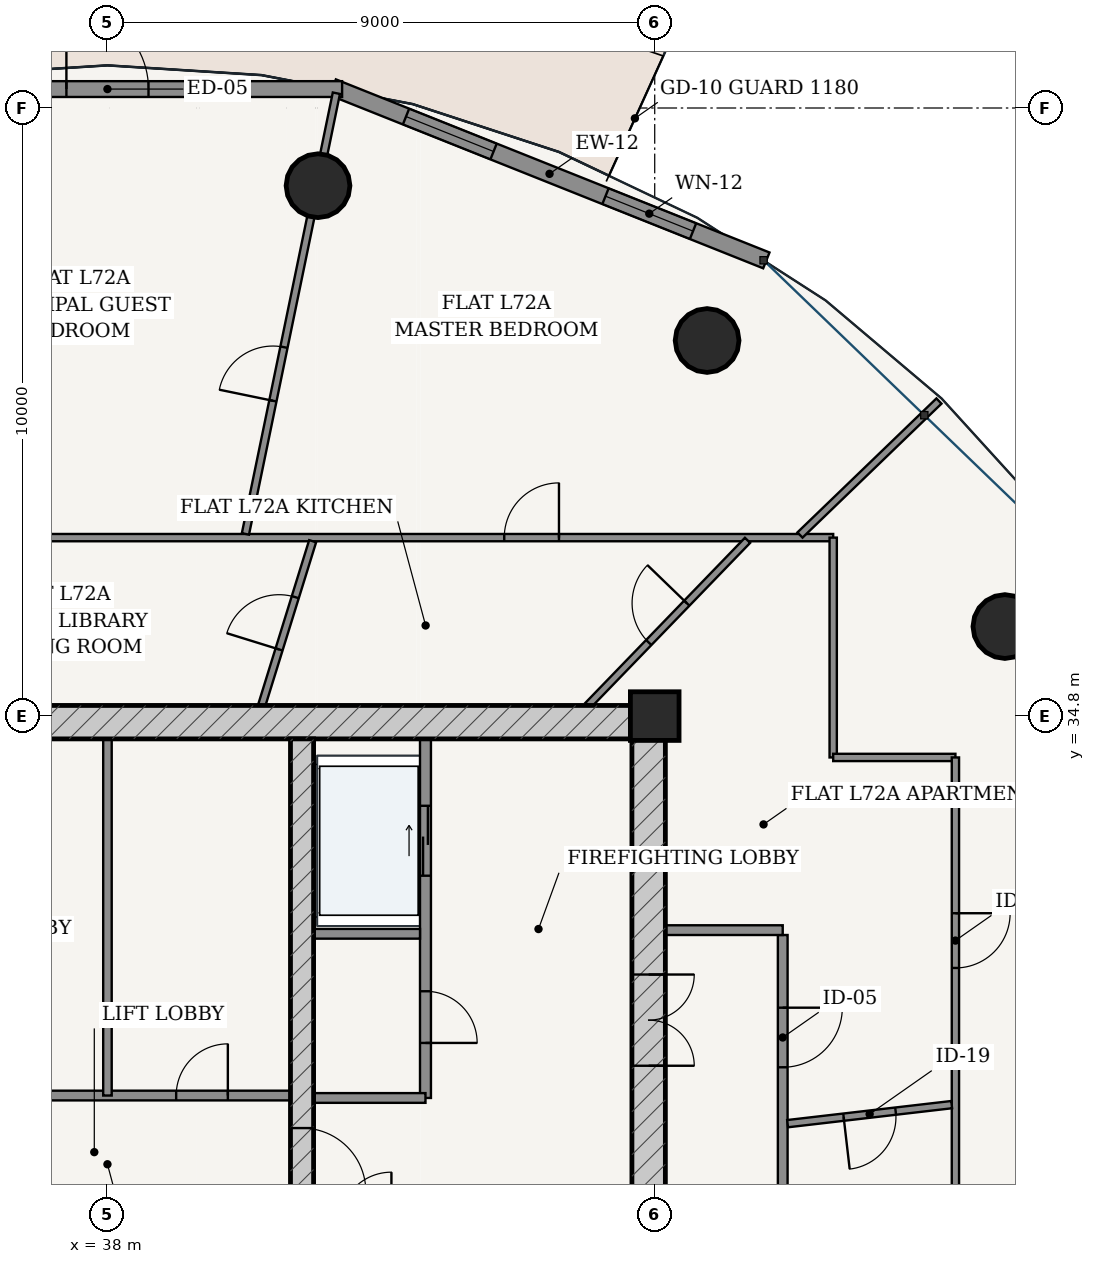
"""IFC4 building model, lengths in metres.
Left out: names, types, materials, properties, quantities, classifications, styles, units other than length and angle.
Written with IfcOpenShell. Run it as: python <this file> out.ifc"""

import sys

from ifc_helpers import new_model, si_unit, direction, frame, frame_2d, origin, origin_2d, place, context, subcontext, project, spatial, rectangle, hollow_circle, extrude, source, transform, mapped, element, fill, save


model = new_model("IFC4")
c1 = context("Model", 3, precision=1e-05, world=origin(), true_north=direction((-0.2419218956, 0.970295726276)))
c2 = subcontext(c1, "Body", "Model", "MODEL_VIEW")
j1 = project(units=[si_unit("LENGTHUNIT", "METRE"), si_unit("PLANEANGLEUNIT", "RADIAN")], contexts=[c1])
p1 = place(None, origin())
s1 = spatial("IfcSite", under=j1, at=p1, CompositionType="ELEMENT")
p2 = place(p1, origin())
s2 = spatial("IfcBuilding", under=s1, at=p2, CompositionType="ELEMENT")
p3 = place(p2, frame((0.0, 0.0, 274.45)))
s3 = spatial("IfcBuildingStorey", under=s2, at=p3, CompositionType="ELEMENT", Elevation=274.45)
p4 = place(p3, frame((47.0, 34.8, 0.0), z_axis=(0.0, 0.0, 1.0), x_axis=(1.0, 0.0, 0.0)))
e1 = element("IfcColumn", 1, at=p4, inside=s3, PredefinedType="COLUMN", context=c2, shape_type="SweptSolid", body=[
    extrude(rectangle(XDim=0.8, YDim=0.8, at=origin_2d()), origin(), (0.0, 0.0, 1.0), 3.75),
])
p5 = place(p3, frame((28.825, 34.7, 0.0), z_axis=(0.0, 0.0, 1.0), x_axis=(1.0, 0.0, 0.0)))
e2 = element("IfcWall", 2, at=p5, inside=s3, PredefinedType="SHEAR", context=c2, shape_type="SweptSolid", body=[
    extrude(rectangle(XDim=18.35, YDim=0.55, at=frame_2d((9.175, 0.0))), origin(), (0.0, 0.0, 1.0), 3.49),
])
p6 = place(p3, frame((46.9, 19.175, 0.0), z_axis=(0.0, 0.0, 1.0), x_axis=(0.0, 1.0, 0.0)))
e3 = element("IfcWall", 3, at=p6, inside=s3, PredefinedType="SHEAR", context=c2, shape_type="SweptSolid", body=[
    extrude(rectangle(XDim=15.25, YDim=0.55, at=frame_2d((7.625, 0.0))), origin(), (0.0, 0.0, 1.0), 3.49),
])
p7 = place(p6, frame((9.875, 0.0, 0.0)))
e4 = element("IfcOpeningElement", 4, at=p7, cuts=e3, PredefinedType="OPENING", context=c2, shape_type="SweptSolid", body=[
    extrude(rectangle(XDim=1.5, YDim=2.2, at=frame_2d((0.75, 1.1))), frame((0.0, 0.285, 0.0), z_axis=(0.0, -1.0, 0.0), x_axis=(1.0, 0.0, 0.0)), (0.0, 0.0, 1.0), 0.57),
])
p8 = place(p3, frame((41.2, 19.175, 0.0), z_axis=(0.0, 0.0, 1.0), x_axis=(0.0, 1.0, 0.0)))
e5 = element("IfcWall", 5, at=p8, inside=s3, PredefinedType="SHEAR", context=c2, shape_type="SweptSolid", body=[
    extrude(rectangle(XDim=15.25, YDim=0.38, at=frame_2d((7.625, 0.0))), origin(), (0.0, 0.0, 1.0), 3.49),
])
p9 = place(p8, frame((7.8, 0.0, 0.0)))
e6 = element("IfcOpeningElement", 6, at=p9, cuts=e5, PredefinedType="OPENING", context=c2, shape_type="SweptSolid", body=[
    extrude(rectangle(XDim=1.05, YDim=2.15, at=frame_2d((0.525, 1.075))), frame((0.0, 0.2, 0.0), z_axis=(0.0, -1.0, 0.0), x_axis=(1.0, 0.0, 0.0)), (0.0, 0.0, 1.0), 0.4),
])
for number, where, z_axis, x_axis in (
    (7, (52.759, 36.272, 0.0), (0.0, 0.0, 1.0), (1.0, 0.0, 0.0)),
    (8, (47.861, 40.977, 0.0), (0.0, 0.0, 1.0), (1.0, 0.0, 0.0)),
    (9, (41.463, 43.522, 0.0), (0.0, 0.0, 1.0), (1.0, 0.0, 0.0)),
):
    element("IfcColumn", number, at=place(p3, frame(where, z_axis=z_axis, x_axis=x_axis)), inside=s3, PredefinedType="COLUMN", context=c2, shape_type="SweptSolid", body=[
        extrude(hollow_circle(Radius=0.525, WallThickness=0.035, at=origin_2d()), origin(), (0.0, 0.0, 1.0), 3.75),
    ])
p10 = place(p3, frame((48.836, 42.294, 0.0), z_axis=(0.0, 0.0, 1.0), x_axis=(-0.928724272392, 0.370771123296, 0.0)))
e10 = element("IfcWall", 10, at=p10, inside=s3, PredefinedType="SOLIDWALL", context=c2, shape_type="SweptSolid", body=[
    extrude(rectangle(XDim=7.678, YDim=0.28, at=frame_2d((3.839, 0.0))), origin(), (0.0, 0.0, 1.0), 3.49),
])
p11 = place(p10, frame((1.298, 0.0, 0.85)))
e11 = element("IfcOpeningElement", 11, at=p11, cuts=e10, PredefinedType="OPENING", context=c2, shape_type="SweptSolid", body=[
    extrude(rectangle(XDim=1.55, YDim=1.95, at=frame_2d((0.775, 0.975))), frame((0.0, 0.15, 0.0), z_axis=(0.0, -1.0, 0.0), x_axis=(1.0, 0.0, 0.0)), (0.0, 0.0, 1.0), 0.3),
])
p12 = place(p10, frame((4.83, 0.0, 0.85)))
e12 = element("IfcOpeningElement", 12, at=p12, cuts=e10, PredefinedType="OPENING", context=c2, shape_type="SweptSolid", body=[
    extrude(rectangle(XDim=1.55, YDim=1.95, at=frame_2d((0.775, 0.975))), frame((0.0, 0.15, 0.0), z_axis=(0.0, -1.0, 0.0), x_axis=(1.0, 0.0, 0.0)), (0.0, 0.0, 1.0), 0.3),
])
p13 = place(p3, frame((41.859, 45.111, 0.0), z_axis=(0.0, 0.0, 1.0), x_axis=(-1.0, 0.0, 0.0)))
e13 = element("IfcWall", 13, at=p13, inside=s3, PredefinedType="SOLIDWALL", context=c2, shape_type="SweptSolid", body=[
    extrude(rectangle(XDim=7.718, YDim=0.26, at=frame_2d((3.859, 0.0))), origin(), (0.0, 0.0, 1.0), 3.49),
])
p14 = place(p13, frame((3.184, 0.0, 0.0)))
e14 = element("IfcOpeningElement", 14, at=p14, cuts=e13, PredefinedType="OPENING", context=c2, shape_type="SweptSolid", body=[
    extrude(rectangle(XDim=1.35, YDim=2.2, at=frame_2d((0.675, 1.1))), frame((0.0, 0.14, 0.0), z_axis=(0.0, -1.0, 0.0), x_axis=(1.0, 0.0, 0.0)), (0.0, 0.0, 1.0), 0.28),
])
p15 = place(p3, frame((43.23, 28.52, 0.0), z_axis=(0.0, 0.0, 1.0), x_axis=(0.0, 1.0, 0.0)))
e15 = element("IfcWall", 15, at=p15, inside=s3, PredefinedType="PARTITIONING", context=c2, shape_type="SweptSolid", body=[
    extrude(rectangle(XDim=5.905, YDim=0.18, at=frame_2d((2.953, 0.0))), origin(), (0.0, 0.0, 1.0), 3.49),
])
p16 = place(p15, frame((0.905, 0.0, 0.0)))
e16 = element("IfcOpeningElement", 16, at=p16, cuts=e15, PredefinedType="OPENING", context=c2, shape_type="SweptSolid", body=[
    extrude(rectangle(XDim=0.85, YDim=2.1, at=frame_2d((0.425, 1.05))), frame((0.0, 0.1, 0.0), z_axis=(0.0, -1.0, 0.0), x_axis=(1.0, 0.0, 0.0)), (0.0, 0.0, 1.0), 0.2),
])
p17 = place(p15, frame((3.655, 0.0, 0.0)))
e17 = element("IfcOpeningElement", 17, at=p17, cuts=e15, PredefinedType="OPENING", context=c2, shape_type="SweptSolid", body=[
    extrude(rectangle(XDim=1.15, YDim=2.2, at=frame_2d((0.575, 1.1))), frame((0.0, 0.1, 0.0), z_axis=(0.0, -1.0, 0.0), x_axis=(1.0, 0.0, 0.0)), (0.0, 0.0, 1.0), 0.2),
])
p18 = place(p3, frame((41.39, 31.22, 0.0), z_axis=(0.0, 0.0, 1.0), x_axis=(1.0, 0.0, 0.0)))
e18 = element("IfcWall", 18, at=p18, inside=s3, PredefinedType="PARTITIONING", context=c2, shape_type="SweptSolid", body=[
    extrude(rectangle(XDim=1.75, YDim=0.16, at=frame_2d((0.875, 0.0))), origin(), (0.0, 0.0, 1.0), 3.49),
])
p19 = place(p3, frame((41.39, 28.52, 0.0), z_axis=(0.0, 0.0, 1.0), x_axis=(1.0, 0.0, 0.0)))
e19 = element("IfcWall", 19, at=p19, inside=s3, PredefinedType="PARTITIONING", context=c2, shape_type="SweptSolid", body=[
    extrude(rectangle(XDim=1.84, YDim=0.16, at=frame_2d((0.92, 0.0))), origin(), (0.0, 0.0, 1.0), 3.49),
])
p20 = place(p3, frame((34.99, 28.56, 0.0), z_axis=(0.0, 0.0, 1.0), x_axis=(1.0, 0.0, 0.0)))
e20 = element("IfcWall", 20, at=p20, inside=s3, PredefinedType="PARTITIONING", context=c2, shape_type="SweptSolid", body=[
    extrude(rectangle(XDim=6.02, YDim=0.16, at=frame_2d((3.01, 0.0))), origin(), (0.0, 0.0, 1.0), 3.49),
])
p21 = place(p20, frame((1.025, 0.0, 0.0)))
e21 = element("IfcOpeningElement", 21, at=p21, cuts=e20, PredefinedType="OPENING", context=c2, shape_type="SweptSolid", body=[
    extrude(rectangle(XDim=0.86, YDim=2.1, at=frame_2d((0.43, 1.05))), frame((0.0, 0.09, 0.0), z_axis=(0.0, -1.0, 0.0), x_axis=(1.0, 0.0, 0.0)), (0.0, 0.0, 1.0), 0.18),
])
p22 = place(p20, frame((4.14, 0.0, 0.0)))
e22 = element("IfcOpeningElement", 22, at=p22, cuts=e20, PredefinedType="OPENING", context=c2, shape_type="SweptSolid", body=[
    extrude(rectangle(XDim=0.85, YDim=2.1, at=frame_2d((0.425, 1.05))), frame((0.0, 0.09, 0.0), z_axis=(0.0, -1.0, 0.0), x_axis=(1.0, 0.0, 0.0)), (0.0, 0.0, 1.0), 0.18),
])
p23 = place(p3, frame((38.0, 28.56, 0.0), z_axis=(0.0, 0.0, 1.0), x_axis=(0.0, 1.0, 0.0)))
e23 = element("IfcWall", 23, at=p23, inside=s3, PredefinedType="PARTITIONING", context=c2, shape_type="SweptSolid", body=[
    extrude(rectangle(XDim=5.865, YDim=0.14, at=frame_2d((2.933, 0.0))), origin(), (0.0, 0.0, 1.0), 3.49),
])
p24 = place(p3, frame((49.105, 17.275, 0.0), z_axis=(0.0, 0.0, 1.0), x_axis=(0.0, 1.0, 0.0)))
e24 = element("IfcWall", 24, at=p24, inside=s3, PredefinedType="PARTITIONING", context=c2, shape_type="SweptSolid", body=[
    extrude(rectangle(XDim=13.925, YDim=0.16, at=frame_2d((6.962, 0.0))), origin(), (0.0, 0.0, 1.0), 3.015),
])
p25 = place(p24, frame((11.75, 0.0, 0.0)))
e25 = element("IfcOpeningElement", 25, at=p25, cuts=e24, PredefinedType="OPENING", context=c2, shape_type="SweptSolid", body=[
    extrude(rectangle(XDim=0.98, YDim=2.2, at=frame_2d((0.49, 1.1))), frame((0.0, 0.09, 0.0), z_axis=(0.0, -1.0, 0.0), x_axis=(1.0, 0.0, 0.0)), (0.0, 0.0, 1.0), 0.18),
])
p26 = place(p3, frame((47.175, 31.28, 0.0), z_axis=(0.0, 0.0, 1.0), x_axis=(1.0, 0.0, 0.0)))
e26 = element("IfcWall", 26, at=p26, inside=s3, PredefinedType="PARTITIONING", context=c2, shape_type="SweptSolid", body=[
    extrude(rectangle(XDim=1.93, YDim=0.16, at=frame_2d((0.965, 0.0))), origin(), (0.0, 0.0, 1.0), 3.49),
])
p27 = place(p3, frame((26.065, 37.735, 0.0), z_axis=(0.0, 0.0, 1.0), x_axis=(1.0, 0.0, 0.0)))
e27 = element("IfcWall", 27, at=p27, inside=s3, PredefinedType="PARTITIONING", context=c2, shape_type="SweptSolid", body=[
    extrude(rectangle(XDim=23.87, YDim=0.12, at=frame_2d((11.935, 0.0))), origin(), (0.0, 0.0, 1.0), 3.015),
])
p28 = place(p27, frame((18.46, 0.0, 0.0)))
e28 = element("IfcOpeningElement", 28, at=p28, cuts=e27, PredefinedType="OPENING", context=c2, shape_type="SweptSolid", body=[
    extrude(rectangle(XDim=0.9, YDim=2.15, at=frame_2d((0.45, 1.075))), frame((0.0, 0.07, 0.0), z_axis=(0.0, -1.0, 0.0), x_axis=(1.0, 0.0, 0.0)), (0.0, 0.0, 1.0), 0.14),
])
p29 = place(p27, frame((3.144, 0.0, 0.0)))
e29 = element("IfcOpeningElement", 29, at=p29, cuts=e27, PredefinedType="OPENING", context=c2, shape_type="SweptSolid", body=[
    extrude(rectangle(XDim=0.9, YDim=2.15, at=frame_2d((0.45, 1.075))), frame((0.0, 0.07, 0.0), z_axis=(0.0, -1.0, 0.0), x_axis=(1.0, 0.0, 0.0)), (0.0, 0.0, 1.0), 0.14),
])
p30 = place(p3, frame((49.935, 37.735, 0.0), z_axis=(0.0, 0.0, 1.0), x_axis=(0.0, -1.0, 0.0)))
e30 = element("IfcWall", 30, at=p30, inside=s3, PredefinedType="PARTITIONING", context=c2, shape_type="SweptSolid", body=[
    extrude(rectangle(XDim=3.615, YDim=0.12, at=frame_2d((1.808, 0.0))), origin(), (0.0, 0.0, 1.0), 3.015),
])
p31 = place(p3, frame((49.935, 34.12, 0.0), z_axis=(0.0, 0.0, 1.0), x_axis=(1.0, 0.0, 0.0)))
e31 = element("IfcWall", 31, at=p31, inside=s3, PredefinedType="PARTITIONING", context=c2, shape_type="SweptSolid", body=[
    extrude(rectangle(XDim=2.01, YDim=0.12, at=frame_2d((1.005, 0.0))), origin(), (0.0, 0.0, 1.0), 3.209),
])
p32 = place(p3, frame((51.945, 34.12, 0.0), z_axis=(0.0, 0.0, 1.0), x_axis=(0.0, -1.0, 0.0)))
e32 = element("IfcWall", 32, at=p32, inside=s3, PredefinedType="PARTITIONING", context=c2, shape_type="SweptSolid", body=[
    extrude(rectangle(XDim=12.786, YDim=0.12, at=frame_2d((6.393, 0.0))), origin(), (0.0, 0.0, 1.0), 3.015),
])
p33 = place(p32, frame((2.562, 0.0, 0.0)))
e33 = element("IfcOpeningElement", 33, at=p33, cuts=e32, PredefinedType="OPENING", context=c2, shape_type="SweptSolid", body=[
    extrude(rectangle(XDim=0.9, YDim=2.15, at=frame_2d((0.45, 1.075))), frame((0.0, 0.07, 0.0), z_axis=(0.0, -1.0, 0.0), x_axis=(1.0, 0.0, 0.0)), (0.0, 0.0, 1.0), 0.14),
])
p34 = place(p3, frame((49.389, 37.778, 0.0), z_axis=(0.0, 0.0, 1.0), x_axis=(0.719985652574, 0.693988948102, 0.0)))
e34 = element("IfcWall", 34, at=p34, inside=s3, PredefinedType="PARTITIONING", context=c2, shape_type="SweptSolid", body=[
    extrude(rectangle(XDim=3.174, YDim=0.12, at=frame_2d((1.587, 0.0))), origin(), (0.0, 0.0, 1.0), 3.121),
])
p35 = place(p3, frame((40.269, 37.796, 0.0), z_axis=(0.0, 0.0, 1.0), x_axis=(0.202101574245, 0.979364566281, 0.0)))
e35 = element("IfcWall", 35, at=p35, inside=s3, PredefinedType="PARTITIONING", context=c2, shape_type="SweptSolid", body=[
    extrude(rectangle(XDim=7.4, YDim=0.12, at=frame_2d((3.7, 0.0))), origin(), (0.0, 0.0, 1.0), 3.015),
])
p36 = place(p35, frame((2.236, 0.0, 0.0)))
e36 = element("IfcOpeningElement", 36, at=p36, cuts=e35, PredefinedType="OPENING", context=c2, shape_type="SweptSolid", body=[
    extrude(rectangle(XDim=0.9, YDim=2.15, at=frame_2d((0.45, 1.075))), frame((0.0, 0.07, 0.0), z_axis=(0.0, -1.0, 0.0), x_axis=(1.0, 0.0, 0.0)), (0.0, 0.0, 1.0), 0.14),
])
p37 = place(p3, frame((49.185, 28.098, 0.0), z_axis=(0.0, 0.0, 1.0), x_axis=(0.993339475655, 0.115224503057, 0.0)))
e37 = element("IfcWall", 37, at=p37, inside=s3, PredefinedType="PARTITIONING", context=c2, shape_type="SweptSolid", body=[
    extrude(rectangle(XDim=2.716, YDim=0.12, at=frame_2d((1.358, 0.0))), origin(), (0.0, 0.0, 1.0), 3.209),
])
p38 = place(p37, frame((0.928, 0.0, 0.0)))
e38 = element("IfcOpeningElement", 38, at=p38, cuts=e37, PredefinedType="OPENING", context=c2, shape_type="SweptSolid", body=[
    extrude(rectangle(XDim=0.86, YDim=2.15, at=frame_2d((0.43, 1.075))), frame((0.0, 0.07, 0.0), z_axis=(0.0, -1.0, 0.0), x_axis=(1.0, 0.0, 0.0)), (0.0, 0.0, 1.0), 0.14),
])
p39 = place(p3, frame((45.903, 34.976, 0.0), z_axis=(0.0, 0.0, 1.0), x_axis=(0.69497417129, 0.719034700999, 0.0)))
e39 = element("IfcWall", 39, at=p39, inside=s3, PredefinedType="PARTITIONING", context=c2, shape_type="SweptSolid", body=[
    extrude(rectangle(XDim=3.775, YDim=0.12, at=frame_2d((1.887, 0.0))), origin(), (0.0, 0.0, 1.0), 3.015),
])
p40 = place(p39, frame((1.437, 0.0, 0.0)))
e40 = element("IfcOpeningElement", 40, at=p40, cuts=e39, PredefinedType="OPENING", context=c2, shape_type="SweptSolid", body=[
    extrude(rectangle(XDim=0.9, YDim=2.15, at=frame_2d((0.45, 1.075))), frame((0.0, 0.07, 0.0), z_axis=(0.0, -1.0, 0.0), x_axis=(1.0, 0.0, 0.0)), (0.0, 0.0, 1.0), 0.14),
])
p41 = place(p3, frame((40.537, 34.977, 0.0), z_axis=(0.0, 0.0, 1.0), x_axis=(0.29633127961, 0.95508521752, 0.0)))
e41 = element("IfcWall", 41, at=p41, inside=s3, PredefinedType="PARTITIONING", context=c2, shape_type="SweptSolid", body=[
    extrude(rectangle(XDim=2.826, YDim=0.12, at=frame_2d((1.413, 0.0))), origin(), (0.0, 0.0, 1.0), 2.575),
])
p42 = place(p41, frame((0.963, 0.0, 0.0)))
e42 = element("IfcOpeningElement", 42, at=p42, cuts=e41, PredefinedType="OPENING", context=c2, shape_type="SweptSolid", body=[
    extrude(rectangle(XDim=0.9, YDim=2.15, at=frame_2d((0.45, 1.075))), frame((0.0, 0.07, 0.0), z_axis=(0.0, -1.0, 0.0), x_axis=(1.0, 0.0, 0.0)), (0.0, 0.0, 1.0), 0.14),
])
m1 = source(origin(), c2, "Body", "SweptSolid", [
    extrude(rectangle(XDim=1.55, YDim=1.95, at=frame_2d((0.775, 0.975))), frame((0.0, 0.03, 0.0), z_axis=(0.0, -1.0, 0.0), x_axis=(1.0, 0.0, 0.0)), (0.0, 0.0, 1.0), 0.06),
])
p43 = place(p11, origin())
e43 = element("IfcWindow", 43, at=p43, inside=s3, PartitioningType="SINGLE_PANEL", PredefinedType="WINDOW", context=c2, shape_type="MappedRepresentation", body=[
    mapped(m1, transform((0.0, 0.0, 0.0), scale=1.0)),
])
fill(e11, e43)
p44 = place(p12, origin())
e44 = element("IfcWindow", 44, at=p44, inside=s3, PartitioningType="SINGLE_PANEL", PredefinedType="WINDOW", context=c2, shape_type="MappedRepresentation", body=[
    mapped(m1, transform((0.0, 0.0, 0.0), scale=1.0)),
])
fill(e12, e44)
m2 = source(origin(), c2, "Body", "SweptSolid", [
    extrude(rectangle(XDim=1.35, YDim=2.2, at=frame_2d((0.675, 1.1))), frame((0.0, 0.025, 0.0), z_axis=(0.0, -1.0, 0.0), x_axis=(1.0, 0.0, 0.0)), (0.0, 0.0, 1.0), 0.05),
])
p45 = place(p14, frame((1.35, 0.0, 0.0), z_axis=(0.0, 0.0, 1.0), x_axis=(-1.0, 0.0, 0.0)))
e45 = element("IfcDoor", 45, at=p45, inside=s3, OperationType="SINGLE_SWING_LEFT", PredefinedType="DOOR", context=c2, shape_type="MappedRepresentation", body=[
    mapped(m2, transform((0.0, 0.0, 0.0), scale=1.0)),
])
fill(e14, e45)
m3 = source(origin(), c2, "Body", "SweptSolid", [
    extrude(rectangle(XDim=1.5, YDim=2.2, at=frame_2d((0.75, 1.1))), frame((0.0, 0.025, 0.0), z_axis=(0.0, -1.0, 0.0), x_axis=(1.0, 0.0, 0.0)), (0.0, 0.0, 1.0), 0.05),
])
p46 = place(p7, frame((1.5, 0.0, 0.0), z_axis=(0.0, 0.0, 1.0), x_axis=(-1.0, 0.0, 0.0)))
e46 = element("IfcDoor", 46, at=p46, inside=s3, OperationType="DOUBLE_DOOR_SINGLE_SWING", PredefinedType="DOOR", context=c2, shape_type="MappedRepresentation", body=[
    mapped(m3, transform((0.0, 0.0, 0.0), scale=1.0)),
])
fill(e4, e46)
m4 = source(origin(), c2, "Body", "SweptSolid", [
    extrude(rectangle(XDim=1.05, YDim=2.15, at=frame_2d((0.525, 1.075))), frame((0.0, 0.025, 0.0), z_axis=(0.0, -1.0, 0.0), x_axis=(1.0, 0.0, 0.0)), (0.0, 0.0, 1.0), 0.05),
])
p47 = place(p9, frame((1.05, 0.0, 0.0), z_axis=(0.0, 0.0, 1.0), x_axis=(-1.0, 0.0, 0.0)))
e47 = element("IfcDoor", 47, at=p47, inside=s3, OperationType="SINGLE_SWING_RIGHT", PredefinedType="DOOR", context=c2, shape_type="MappedRepresentation", body=[
    mapped(m4, transform((0.0, 0.0, 0.0), scale=1.0)),
])
fill(e6, e47)
m5 = source(origin(), c2, "Body", "SweptSolid", [
    extrude(rectangle(XDim=0.85, YDim=2.1, at=frame_2d((0.425, 1.05))), frame((0.0, 0.025, 0.0), z_axis=(0.0, -1.0, 0.0), x_axis=(1.0, 0.0, 0.0)), (0.0, 0.0, 1.0), 0.05),
])
p48 = place(p16, frame((0.85, 0.0, 0.0), z_axis=(0.0, 0.0, 1.0), x_axis=(-1.0, 0.0, 0.0)))
e48 = element("IfcDoor", 48, at=p48, inside=s3, OperationType="SINGLE_SWING_RIGHT", PredefinedType="DOOR", context=c2, shape_type="MappedRepresentation", body=[
    mapped(m5, transform((0.0, 0.0, 0.0), scale=1.0)),
])
fill(e16, e48)
p49 = place(p22, origin())
e49 = element("IfcDoor", 49, at=p49, inside=s3, OperationType="SINGLE_SWING_RIGHT", PredefinedType="DOOR", context=c2, shape_type="MappedRepresentation", body=[
    mapped(m5, transform((0.0, 0.0, 0.0), scale=1.0)),
])
fill(e22, e49)
m6 = source(origin(), c2, "Body", "SweptSolid", [
    extrude(rectangle(XDim=1.15, YDim=2.2, at=frame_2d((0.575, 1.1))), frame((0.0, 0.025, 0.0), z_axis=(0.0, -1.0, 0.0), x_axis=(1.0, 0.0, 0.0)), (0.0, 0.0, 1.0), 0.05),
])
p50 = place(p17, origin())
e50 = element("IfcDoor", 50, at=p50, inside=s3, OperationType="DOUBLE_DOOR_SLIDING", PredefinedType="DOOR", context=c2, shape_type="MappedRepresentation", body=[
    mapped(m6, transform((0.0, 0.0, 0.0), scale=1.0)),
])
fill(e17, e50)
m7 = source(origin(), c2, "Body", "SweptSolid", [
    extrude(rectangle(XDim=0.98, YDim=2.2, at=frame_2d((0.49, 1.1))), frame((0.0, 0.025, 0.0), z_axis=(0.0, -1.0, 0.0), x_axis=(1.0, 0.0, 0.0)), (0.0, 0.0, 1.0), 0.05),
])
p51 = place(p25, frame((0.98, 0.0, 0.0), z_axis=(0.0, 0.0, 1.0), x_axis=(-1.0, 0.0, 0.0)))
e51 = element("IfcDoor", 51, at=p51, inside=s3, OperationType="SINGLE_SWING_LEFT", PredefinedType="DOOR", context=c2, shape_type="MappedRepresentation", body=[
    mapped(m7, transform((0.0, 0.0, 0.0), scale=1.0)),
])
fill(e25, e51)
m8 = source(origin(), c2, "Body", "SweptSolid", [
    extrude(rectangle(XDim=0.86, YDim=2.15, at=frame_2d((0.43, 1.075))), frame((0.0, 0.025, 0.0), z_axis=(0.0, -1.0, 0.0), x_axis=(1.0, 0.0, 0.0)), (0.0, 0.0, 1.0), 0.05),
])
p52 = place(p38, frame((0.86, 0.0, 0.0), z_axis=(0.0, 0.0, 1.0), x_axis=(-1.0, 0.0, 0.0)))
e52 = element("IfcDoor", 52, at=p52, inside=s3, OperationType="SINGLE_SWING_RIGHT", PredefinedType="DOOR", context=c2, shape_type="MappedRepresentation", body=[
    mapped(m8, transform((0.0, 0.0, 0.0), scale=1.0)),
])
fill(e38, e52)
m9 = source(origin(), c2, "Body", "SweptSolid", [
    extrude(rectangle(XDim=0.9, YDim=2.15, at=frame_2d((0.45, 1.075))), frame((0.0, 0.025, 0.0), z_axis=(0.0, -1.0, 0.0), x_axis=(1.0, 0.0, 0.0)), (0.0, 0.0, 1.0), 0.05),
])
p53 = place(p33, origin())
e53 = element("IfcDoor", 53, at=p53, inside=s3, OperationType="SINGLE_SWING_LEFT", PredefinedType="DOOR", context=c2, shape_type="MappedRepresentation", body=[
    mapped(m9, transform((0.0, 0.0, 0.0), scale=1.0)),
])
fill(e33, e53)
p54 = place(p40, origin())
e54 = element("IfcDoor", 54, at=p54, inside=s3, OperationType="SINGLE_SWING_RIGHT", PredefinedType="DOOR", context=c2, shape_type="MappedRepresentation", body=[
    mapped(m9, transform((0.0, 0.0, 0.0), scale=1.0)),
])
fill(e40, e54)
p55 = place(p42, origin())
e55 = element("IfcDoor", 55, at=p55, inside=s3, OperationType="SINGLE_SWING_LEFT", PredefinedType="DOOR", context=c2, shape_type="MappedRepresentation", body=[
    mapped(m9, transform((0.0, 0.0, 0.0), scale=1.0)),
])
fill(e42, e55)
p56 = place(p28, origin())
e56 = element("IfcDoor", 56, at=p56, inside=s3, OperationType="SINGLE_SWING_RIGHT", PredefinedType="DOOR", context=c2, shape_type="MappedRepresentation", body=[
    mapped(m9, transform((0.0, 0.0, 0.0), scale=1.0)),
])
fill(e28, e56)
p57 = place(p36, origin())
e57 = element("IfcDoor", 57, at=p57, inside=s3, OperationType="SINGLE_SWING_LEFT", PredefinedType="DOOR", context=c2, shape_type="MappedRepresentation", body=[
    mapped(m9, transform((0.0, 0.0, 0.0), scale=1.0)),
])
fill(e36, e57)
save(model, sys.argv[1])
